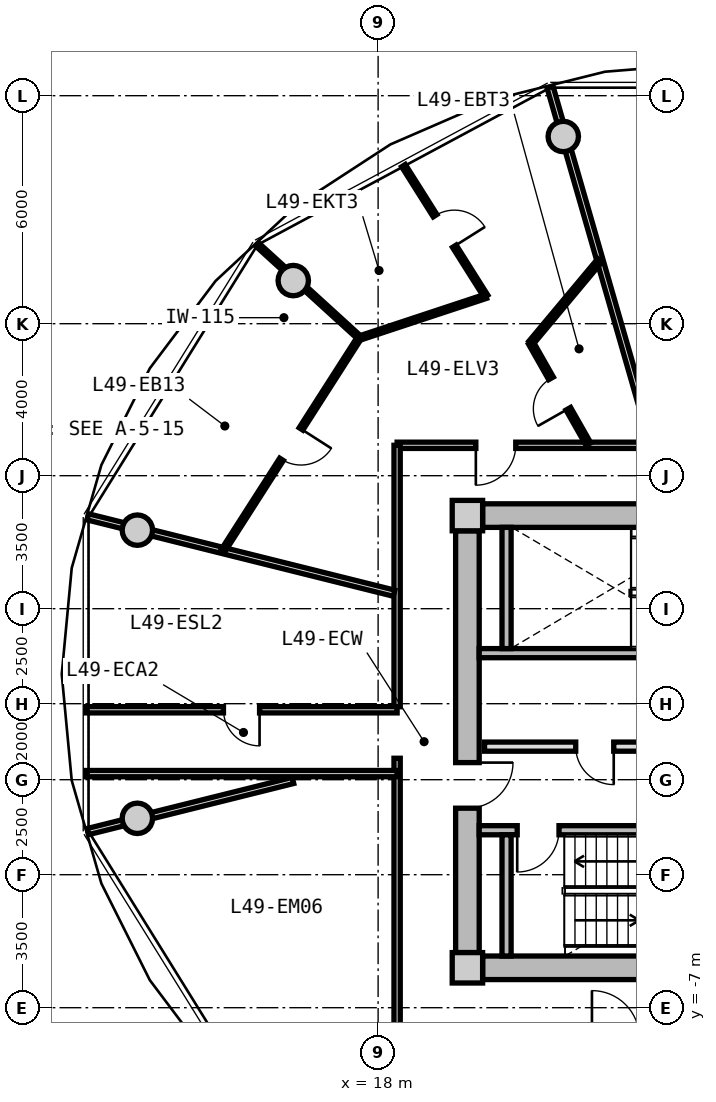
"""IFC4 building model, lengths in metres.
Left out: names, types, materials, properties, quantities, classifications, styles, units other than length and angle.
Written with IfcOpenShell. Run it as: python <this file> out.ifc"""

import sys

from ifc_helpers import new_model, si_unit, direction, frame, frame_2d, origin, origin_2d, place, context, subcontext, project, spatial, rectangle, circle, extrude, source, transform, mapped, element, fill, save


model = new_model("IFC4")
c1 = context("Model", 3, precision=1e-05, world=origin(), true_north=direction((0.0, 1.0)))
c2 = subcontext(c1, "Body", "Model", "MODEL_VIEW")
j1 = project(units=[si_unit("LENGTHUNIT", "METRE"), si_unit("PLANEANGLEUNIT", "RADIAN")], contexts=[c1])
p1 = place(None, origin())
s1 = spatial("IfcSite", under=j1, at=p1, CompositionType="ELEMENT")
p2 = place(p1, origin())
s2 = spatial("IfcBuilding", under=s1, at=p2, CompositionType="ELEMENT")
p3 = place(p2, frame((0.0, 0.0, 158.7)))
s3 = spatial("IfcBuildingStorey", under=s2, at=p3, CompositionType="ELEMENT", Elevation=158.7)
m1 = source(origin(), c2, "Body", "SweptSolid", [
    extrude(rectangle(XDim=0.8, YDim=0.8, at=origin_2d()), origin(), (0.0, 0.0, 1.0), 3.05),
])
for number, where, z_axis, x_axis in (
    (1, (20.35, -5.95, 0.0), (0.0, 0.0, 1.0), (1.0, 0.0, 0.0)),
    (2, (20.35, 5.95, 0.0), (0.0, 0.0, 1.0), (1.0, 0.0, 0.0)),
):
    element("IfcColumn", number, at=place(p3, frame(where, z_axis=z_axis, x_axis=x_axis)), inside=s3, PredefinedType="COLUMN", context=c2, shape_type="MappedRepresentation", body=[
        mapped(m1, transform((0.0, 0.0, 0.0), x_axis=(1.0, 0.0, 0.0), y_axis=(0.0, 1.0, 0.0), z_axis=(0.0, 0.0, 1.0), scale=1.0)),
    ])
m2 = source(origin(), c2, "Body", "SweptSolid", [
    extrude(rectangle(XDim=14.5, YDim=0.62, at=frame_2d((7.25, 0.0))), origin(), (0.0, 0.0, 1.0), 2.81),
])
for number, where, z_axis, x_axis in (
    (3, (20.75, 5.95, 0.0), (0.0, 0.0, 1.0), (1.0, 0.0, 0.0)),
    (4, (35.25, -5.95, 0.0), (0.0, 0.0, 1.0), (-1.0, 0.0, 0.0)),
):
    element("IfcWall", number, at=place(p3, frame(where, z_axis=z_axis, x_axis=x_axis)), inside=s3, PredefinedType="SHEAR", context=c2, shape_type="MappedRepresentation", body=[
        mapped(m2, transform((0.0, 0.0, 0.0), x_axis=(1.0, 0.0, 0.0), y_axis=(0.0, 1.0, 0.0), z_axis=(0.0, 0.0, 1.0), scale=1.0)),
    ])
m3 = source(origin(), c2, "Body", "SweptSolid", [
    extrude(rectangle(XDim=11.1, YDim=0.62, at=frame_2d((5.55, 0.0))), origin(), (0.0, 0.0, 1.0), 2.81),
])
p4 = place(p3, frame((20.35, -5.55, 0.0), z_axis=(0.0, 0.0, 1.0), x_axis=(0.0, 1.0, 0.0)))
e5 = element("IfcWall", 5, at=p4, inside=s3, PredefinedType="SHEAR", context=c2, shape_type="MappedRepresentation", body=[
    mapped(m3, transform((0.0, 0.0, 0.0), x_axis=(1.0, 0.0, 0.0), y_axis=(0.0, 1.0, 0.0), z_axis=(0.0, 0.0, 1.0), scale=1.0)),
])
p5 = place(p4, frame((3.8, 0.0, 0.0)))
e6 = element("IfcOpeningElement", 6, at=p5, cuts=e5, PredefinedType="OPENING", context=c2, shape_type="SweptSolid", body=[
    extrude(rectangle(XDim=1.2, YDim=2.15, at=frame_2d((0.6, 1.075))), frame((0.0, 0.32, 0.0), z_axis=(0.0, -1.0, 0.0), x_axis=(1.0, 0.0, 0.0)), (0.0, 0.0, 1.0), 0.64),
])
m4 = source(origin(), c2, "Body", "SweptSolid", [
    extrude(circle(Radius=0.4, at=origin_2d()), origin(), (0.0, 0.0, 1.0), 3.05),
])
for number, where, z_axis, x_axis in (
    (7, (22.873, 15.926, 0.0), (0.0, 0.0, 1.0), (1.0, 0.0, 0.0)),
    (8, (15.767, 12.135, 0.0), (0.0, 0.0, 1.0), (1.0, 0.0, 0.0)),
    (9, (11.665, 5.567, 0.0), (0.0, 0.0, 1.0), (1.0, 0.0, 0.0)),
    (10, (11.665, -2.016, 0.0), (0.0, 0.0, 1.0), (1.0, 0.0, 0.0)),
):
    element("IfcColumn", number, at=place(p3, frame(where, z_axis=z_axis, x_axis=x_axis)), inside=s3, PredefinedType="COLUMN", context=c2, shape_type="MappedRepresentation", body=[
        mapped(m4, transform((0.0, 0.0, 0.0), x_axis=(1.0, 0.0, 0.0), y_axis=(0.0, 1.0, 0.0), z_axis=(0.0, 0.0, 1.0), scale=1.0)),
    ])
m5 = source(origin(), c2, "Body", "SweptSolid", [
    extrude(rectangle(XDim=7.88, YDim=0.24, at=frame_2d((3.94, 0.0))), origin(), (0.0, 0.0, 1.0), 2.81),
])
p6 = place(p3, frame((20.66, 2.33, 0.0), z_axis=(0.0, 0.0, 1.0), x_axis=(1.0, 0.0, 0.0)))
e11 = element("IfcWall", 11, at=p6, inside=s3, PredefinedType="PARTITIONING", context=c2, shape_type="MappedRepresentation", body=[
    mapped(m5, transform((0.0, 0.0, 0.0), x_axis=(1.0, 0.0, 0.0), y_axis=(0.0, 1.0, 0.0), z_axis=(0.0, 0.0, 1.0), scale=1.0)),
])
m6 = source(origin(), c2, "Body", "SweptSolid", [
    extrude(rectangle(XDim=3.19, YDim=0.24, at=frame_2d((1.595, 0.0))), origin(), (0.0, 0.0, 1.0), 2.81),
])
p7 = place(p3, frame((21.38, 2.45, 0.0), z_axis=(0.0, 0.0, 1.0), x_axis=(0.0, 1.0, 0.0)))
e12 = element("IfcWall", 12, at=p7, inside=s3, PredefinedType="PARTITIONING", context=c2, shape_type="MappedRepresentation", body=[
    mapped(m6, transform((0.0, 0.0, 0.0), x_axis=(1.0, 0.0, 0.0), y_axis=(0.0, 1.0, 0.0), z_axis=(0.0, 0.0, 1.0), scale=1.0)),
])
p8 = place(p3, frame((20.66, -2.33, 0.0), z_axis=(0.0, 0.0, 1.0), x_axis=(1.0, 0.0, 0.0)))
e13 = element("IfcWall", 13, at=p8, inside=s3, PredefinedType="PARTITIONING", context=c2, shape_type="MappedRepresentation", body=[
    mapped(m5, transform((0.0, 0.0, 0.0), x_axis=(1.0, 0.0, 0.0), y_axis=(0.0, 1.0, 0.0), z_axis=(0.0, 0.0, 1.0), scale=1.0)),
])
p9 = place(p8, frame((1.0, 0.0, 0.0)))
e14 = element("IfcOpeningElement", 14, at=p9, cuts=e13, PredefinedType="OPENING", context=c2, shape_type="SweptSolid", body=[
    extrude(rectangle(XDim=1.1, YDim=2.15, at=frame_2d((0.55, 1.075))), frame((0.0, 0.13, 0.0), z_axis=(0.0, -1.0, 0.0), x_axis=(1.0, 0.0, 0.0)), (0.0, 0.0, 1.0), 0.26),
])
p10 = place(p3, frame((21.38, -5.64, 0.0), z_axis=(0.0, 0.0, 1.0), x_axis=(0.0, 1.0, 0.0)))
e15 = element("IfcWall", 15, at=p10, inside=s3, PredefinedType="PARTITIONING", context=c2, shape_type="MappedRepresentation", body=[
    mapped(m6, transform((0.0, 0.0, 0.0), x_axis=(1.0, 0.0, 0.0), y_axis=(0.0, 1.0, 0.0), z_axis=(0.0, 0.0, 1.0), scale=1.0)),
])
m7 = source(origin(), c2, "Body", "SweptSolid", [
    extrude(rectangle(XDim=7.62, YDim=0.24, at=frame_2d((3.81, 0.0))), origin(), (0.0, 0.0, 1.0), 2.795),
])
p11 = place(p3, frame((20.8, -0.13, 0.0), z_axis=(0.0, 0.0, 1.0), x_axis=(1.0, 0.0, 0.0)))
e16 = element("IfcWall", 16, at=p11, inside=s3, PredefinedType="PARTITIONING", context=c2, shape_type="MappedRepresentation", body=[
    mapped(m7, transform((0.0, 0.0, 0.0), x_axis=(1.0, 0.0, 0.0), y_axis=(0.0, 1.0, 0.0), z_axis=(0.0, 0.0, 1.0), scale=1.0)),
])
p12 = place(p11, frame((6.22, 0.0, 0.0)))
e17 = element("IfcOpeningElement", 17, at=p12, cuts=e16, PredefinedType="OPENING", context=c2, shape_type="SweptSolid", body=[
    extrude(rectangle(XDim=1.0, YDim=2.1, at=frame_2d((0.5, 1.05))), frame((0.0, 0.13, 0.0), z_axis=(0.0, -1.0, 0.0), x_axis=(1.0, 0.0, 0.0)), (0.0, 0.0, 1.0), 0.26),
])
p13 = place(p11, frame((2.4, 0.0, 0.0)))
e18 = element("IfcOpeningElement", 18, at=p13, cuts=e16, PredefinedType="OPENING", context=c2, shape_type="SweptSolid", body=[
    extrude(rectangle(XDim=1.0, YDim=2.1, at=frame_2d((0.5, 1.05))), frame((0.0, 0.13, 0.0), z_axis=(0.0, -1.0, 0.0), x_axis=(1.0, 0.0, 0.0)), (0.0, 0.0, 1.0), 0.26),
])
m8 = source(origin(), c2, "Body", "SweptSolid", [
    extrude(rectangle(XDim=8.58, YDim=0.165, at=frame_2d((4.29, 0.0))), origin(), (0.0, 0.0, 1.0), 2.795),
])
p14 = place(p3, frame((18.5, 7.8, 0.0), z_axis=(0.0, 0.0, 1.0), x_axis=(1.0, 0.0, 0.0)))
e19 = element("IfcWall", 19, at=p14, inside=s3, PredefinedType="PARTITIONING", context=c2, shape_type="MappedRepresentation", body=[
    mapped(m8, transform((0.0, 0.0, 0.0), x_axis=(1.0, 0.0, 0.0), y_axis=(0.0, 1.0, 0.0), z_axis=(0.0, 0.0, 1.0), scale=1.0)),
])
p15 = place(p14, frame((2.072, 0.0, 0.0)))
e20 = element("IfcOpeningElement", 20, at=p15, cuts=e19, PredefinedType="OPENING", context=c2, shape_type="SweptSolid", body=[
    extrude(rectangle(XDim=1.05, YDim=2.15, at=frame_2d((0.525, 1.075))), frame((0.0, 0.093, 0.0), z_axis=(0.0, -1.0, 0.0), x_axis=(1.0, 0.0, 0.0)), (0.0, 0.0, 1.0), 0.185),
])
m9 = source(origin(), c2, "Body", "SweptSolid", [
    extrude(rectangle(XDim=7.365, YDim=0.165, at=frame_2d((3.682, 0.0))), origin(), (0.0, 0.0, 1.0), 2.795),
])
p16 = place(p3, frame((18.5, -7.8, 0.0), z_axis=(0.0, 0.0, 1.0), x_axis=(0.0, 1.0, 0.0)))
e21 = element("IfcWall", 21, at=p16, inside=s3, PredefinedType="PARTITIONING", context=c2, shape_type="MappedRepresentation", body=[
    mapped(m9, transform((0.0, 0.0, 0.0), x_axis=(1.0, 0.0, 0.0), y_axis=(0.0, 1.0, 0.0), z_axis=(0.0, 0.0, 1.0), scale=1.0)),
])
m10 = source(origin(), c2, "Body", "SweptSolid", [
    extrude(rectangle(XDim=6.88, YDim=0.165, at=frame_2d((3.44, 0.0))), origin(), (0.0, 0.0, 1.0), 2.795),
])
p17 = place(p3, frame((18.5, 0.92, 0.0), z_axis=(0.0, 0.0, 1.0), x_axis=(0.0, 1.0, 0.0)))
e22 = element("IfcWall", 22, at=p17, inside=s3, PredefinedType="PARTITIONING", context=c2, shape_type="MappedRepresentation", body=[
    mapped(m10, transform((0.0, 0.0, 0.0), x_axis=(1.0, 0.0, 0.0), y_axis=(0.0, 1.0, 0.0), z_axis=(0.0, 0.0, 1.0), scale=1.0)),
])
m11 = source(origin(), c2, "Body", "SweptSolid", [
    extrude(rectangle(XDim=9.73, YDim=0.165, at=frame_2d((4.865, 0.0))), origin(), (0.0, 0.0, 1.0), 2.345),
])
p18 = place(p3, frame((25.217, 7.88, 0.0), z_axis=(0.0, 0.0, 1.0), x_axis=(-0.27679492614, 0.960929013436, 0.0)))
e23 = element("IfcWall", 23, at=p18, inside=s3, PredefinedType="PARTITIONING", context=c2, shape_type="MappedRepresentation", body=[
    mapped(m11, transform((0.0, 0.0, 0.0), x_axis=(1.0, 0.0, 0.0), y_axis=(0.0, 1.0, 0.0), z_axis=(0.0, 0.0, 1.0), scale=1.0)),
])
m12 = source(origin(), c2, "Body", "SweptSolid", [
    extrude(rectangle(XDim=8.305, YDim=0.165, at=frame_2d((4.153, 0.0))), origin(), (0.0, 0.0, 1.0), 2.345),
])
p19 = place(p3, frame((18.42, 3.908, 0.0), z_axis=(0.0, 0.0, 1.0), x_axis=(-0.970309994378, 0.241864662175, 0.0)))
e24 = element("IfcWall", 24, at=p19, inside=s3, PredefinedType="PARTITIONING", context=c2, shape_type="MappedRepresentation", body=[
    mapped(m12, transform((0.0, 0.0, 0.0), x_axis=(1.0, 0.0, 0.0), y_axis=(0.0, 1.0, 0.0), z_axis=(0.0, 0.0, 1.0), scale=1.0)),
])
m13 = source(origin(), c2, "Body", "SweptSolid", [
    extrude(rectangle(XDim=5.564, YDim=0.165, at=frame_2d((2.782, 0.0))), origin(), (0.0, 0.0, 1.0), 2.345),
])
p20 = place(p3, frame((15.76, -1.02, 0.0), z_axis=(0.0, 0.0, 1.0), x_axis=(-0.970315176167, -0.241843872984, 0.0)))
e25 = element("IfcWall", 25, at=p20, inside=s3, PredefinedType="PARTITIONING", context=c2, shape_type="MappedRepresentation", body=[
    mapped(m13, transform((0.0, 0.0, 0.0), x_axis=(1.0, 0.0, 0.0), y_axis=(0.0, 1.0, 0.0), z_axis=(0.0, 0.0, 1.0), scale=1.0)),
])
m14 = source(origin(), c2, "Body", "SweptSolid", [
    extrude(rectangle(XDim=8.189, YDim=0.165, at=frame_2d((4.094, 0.0))), origin(), (0.0, 0.0, 1.0), 2.795),
])
p21 = place(p3, frame((10.311, 0.84, 0.0), z_axis=(0.0, 0.0, 1.0), x_axis=(1.0, 0.0, 0.0)))
e26 = element("IfcWall", 26, at=p21, inside=s3, PredefinedType="PARTITIONING", context=c2, shape_type="MappedRepresentation", body=[
    mapped(m14, transform((0.0, 0.0, 0.0), x_axis=(1.0, 0.0, 0.0), y_axis=(0.0, 1.0, 0.0), z_axis=(0.0, 0.0, 1.0), scale=1.0)),
])
p22 = place(p21, frame((3.619, 0.0, 0.0)))
e27 = element("IfcOpeningElement", 27, at=p22, cuts=e26, PredefinedType="OPENING", context=c2, shape_type="SweptSolid", body=[
    extrude(rectangle(XDim=0.95, YDim=2.1, at=frame_2d((0.475, 1.05))), frame((0.0, 0.093, 0.0), z_axis=(0.0, -1.0, 0.0), x_axis=(1.0, 0.0, 0.0)), (0.0, 0.0, 1.0), 0.185),
])
p23 = place(p3, frame((18.5, -0.84, 0.0), z_axis=(0.0, 0.0, 1.0), x_axis=(-1.0, 0.0, 0.0)))
e28 = element("IfcWall", 28, at=p23, inside=s3, PredefinedType="PARTITIONING", context=c2, shape_type="MappedRepresentation", body=[
    mapped(m14, transform((0.0, 0.0, 0.0), x_axis=(1.0, 0.0, 0.0), y_axis=(0.0, 1.0, 0.0), z_axis=(0.0, 0.0, 1.0), scale=1.0)),
])
m15 = source(origin(), c2, "Body", "SweptSolid", [
    extrude(rectangle(XDim=6.654, YDim=0.115, at=frame_2d((3.327, 0.0))), origin(), (0.0, 0.0, 1.0), 2.795),
])
p24 = place(p3, frame((17.509, 10.632, 0.0), z_axis=(0.0, 0.0, 1.0), x_axis=(-0.53923796816, -0.842153438332, 0.0)))
e29 = element("IfcWall", 29, at=p24, inside=s3, PredefinedType="PARTITIONING", context=c2, shape_type="MappedRepresentation", body=[
    mapped(m15, transform((0.0, 0.0, 0.0), x_axis=(1.0, 0.0, 0.0), y_axis=(0.0, 1.0, 0.0), z_axis=(0.0, 0.0, 1.0), scale=1.0)),
])
p25 = place(p24, frame((2.852, 0.0, 0.0)))
e30 = element("IfcOpeningElement", 30, at=p25, cuts=e29, PredefinedType="OPENING", context=c2, shape_type="SweptSolid", body=[
    extrude(rectangle(XDim=0.95, YDim=2.1, at=frame_2d((0.475, 1.05))), frame((0.0, 0.067, 0.0), z_axis=(0.0, -1.0, 0.0), x_axis=(1.0, 0.0, 0.0)), (0.0, 0.0, 1.0), 0.135),
])
m16 = source(origin(), c2, "Body", "SweptSolid", [
    extrude(rectangle(XDim=3.648, YDim=0.115, at=frame_2d((1.824, 0.0))), origin(), (0.0, 0.0, 1.0), 2.345),
])
p26 = place(p3, frame((17.509, 10.632, 0.0), z_axis=(0.0, 0.0, 1.0), x_axis=(-0.739109697605, 0.67358507622, 0.0)))
e31 = element("IfcWall", 31, at=p26, inside=s3, PredefinedType="PARTITIONING", context=c2, shape_type="MappedRepresentation", body=[
    mapped(m16, transform((0.0, 0.0, 0.0), x_axis=(1.0, 0.0, 0.0), y_axis=(0.0, 1.0, 0.0), z_axis=(0.0, 0.0, 1.0), scale=1.0)),
])
m17 = source(origin(), c2, "Body", "SweptSolid", [
    extrude(rectangle(XDim=3.064, YDim=0.14, at=frame_2d((1.532, 0.0))), origin(), (0.0, 0.0, 1.0), 2.795),
])
p27 = place(p3, frame((23.534, 7.83, 0.0), z_axis=(0.0, 0.0, 1.0), x_axis=(-0.494103864861, 0.869402881712, 0.0)))
e32 = element("IfcWall", 32, at=p27, inside=s3, PredefinedType="PARTITIONING", context=c2, shape_type="MappedRepresentation", body=[
    mapped(m17, transform((0.0, 0.0, 0.0), x_axis=(1.0, 0.0, 0.0), y_axis=(0.0, 1.0, 0.0), z_axis=(0.0, 0.0, 1.0), scale=1.0)),
])
p28 = place(p27, frame((1.072, 0.0, 0.0)))
e33 = element("IfcOpeningElement", 33, at=p28, cuts=e32, PredefinedType="OPENING", context=c2, shape_type="SweptSolid", body=[
    extrude(rectangle(XDim=0.92, YDim=2.1, at=frame_2d((0.46, 1.05))), frame((0.0, 0.08, 0.0), z_axis=(0.0, -1.0, 0.0), x_axis=(1.0, 0.0, 0.0)), (0.0, 0.0, 1.0), 0.16),
])
m18 = source(origin(), c2, "Body", "SweptSolid", [
    extrude(rectangle(XDim=2.833, YDim=0.14, at=frame_2d((1.417, 0.0))), origin(), (0.0, 0.0, 1.0), 2.795),
])
p29 = place(p3, frame((22.02, 10.494, 0.0), z_axis=(0.0, 0.0, 1.0), x_axis=(0.64098072766, 0.767556972979, 0.0)))
e34 = element("IfcWall", 34, at=p29, inside=s3, PredefinedType="PARTITIONING", context=c2, shape_type="MappedRepresentation", body=[
    mapped(m18, transform((0.0, 0.0, 0.0), x_axis=(1.0, 0.0, 0.0), y_axis=(0.0, 1.0, 0.0), z_axis=(0.0, 0.0, 1.0), scale=1.0)),
])
m19 = source(origin(), c2, "Body", "SweptSolid", [
    extrude(rectangle(XDim=4.066, YDim=0.115, at=frame_2d((2.033, 0.0))), origin(), (0.0, 0.0, 1.0), 2.795),
])
p30 = place(p3, frame((20.838, 11.721, 0.0), z_axis=(0.0, 0.0, 1.0), x_axis=(-0.533669868169, 0.8456928945, 0.0)))
e35 = element("IfcWall", 35, at=p30, inside=s3, PredefinedType="PARTITIONING", context=c2, shape_type="MappedRepresentation", body=[
    mapped(m19, transform((0.0, 0.0, 0.0), x_axis=(1.0, 0.0, 0.0), y_axis=(0.0, 1.0, 0.0), z_axis=(0.0, 0.0, 1.0), scale=1.0)),
])
p31 = place(p30, frame((1.558, 0.0, 0.0)))
e36 = element("IfcOpeningElement", 36, at=p31, cuts=e35, PredefinedType="OPENING", context=c2, shape_type="SweptSolid", body=[
    extrude(rectangle(XDim=0.95, YDim=2.1, at=frame_2d((0.475, 1.05))), frame((0.0, 0.067, 0.0), z_axis=(0.0, -1.0, 0.0), x_axis=(1.0, 0.0, 0.0)), (0.0, 0.0, 1.0), 0.135),
])
m20 = source(origin(), c2, "Body", "SweptSolid", [
    extrude(rectangle(XDim=3.496, YDim=0.115, at=frame_2d((1.748, 0.0))), origin(), (0.0, 0.0, 1.0), 2.795),
])
p32 = place(p3, frame((20.838, 11.721, 0.0), z_axis=(0.0, 0.0, 1.0), x_axis=(-0.949420852529, -0.314006440672, 0.0)))
e37 = element("IfcWall", 37, at=p32, inside=s3, PredefinedType="PARTITIONING", context=c2, shape_type="MappedRepresentation", body=[
    mapped(m20, transform((0.0, 0.0, 0.0), x_axis=(1.0, 0.0, 0.0), y_axis=(0.0, 1.0, 0.0), z_axis=(0.0, 0.0, 1.0), scale=1.0)),
])
m21 = source(origin(), c2, "Body", "SweptSolid", [
    extrude(rectangle(XDim=1.1, YDim=2.15, at=frame_2d((0.55, 1.075))), frame((0.0, 0.025, 0.0), z_axis=(0.0, -1.0, 0.0), x_axis=(1.0, 0.0, 0.0)), (0.0, 0.0, 1.0), 0.05),
])
p33 = place(p9, frame((1.1, 0.0, 0.0), z_axis=(0.0, 0.0, 1.0), x_axis=(-1.0, 0.0, 0.0)))
e38 = element("IfcDoor", 38, at=p33, inside=s3, OperationType="SINGLE_SWING_RIGHT", PredefinedType="DOOR", context=c2, shape_type="MappedRepresentation", body=[
    mapped(m21, transform((0.0, 0.0, 0.0), x_axis=(1.0, 0.0, 0.0), y_axis=(0.0, 1.0, 0.0), z_axis=(0.0, 0.0, 1.0), scale=1.0)),
])
fill(e14, e38)
m22 = source(origin(), c2, "Body", "SweptSolid", [
    extrude(rectangle(XDim=1.2, YDim=2.15, at=frame_2d((0.6, 1.075))), frame((0.0, 0.025, 0.0), z_axis=(0.0, -1.0, 0.0), x_axis=(1.0, 0.0, 0.0)), (0.0, 0.0, 1.0), 0.05),
])
p34 = place(p5, frame((1.2, 0.0, 0.0), z_axis=(0.0, 0.0, 1.0), x_axis=(-1.0, 0.0, 0.0)))
e39 = element("IfcDoor", 39, at=p34, inside=s3, OperationType="SINGLE_SWING_LEFT", PredefinedType="DOOR", context=c2, shape_type="MappedRepresentation", body=[
    mapped(m22, transform((0.0, 0.0, 0.0), x_axis=(1.0, 0.0, 0.0), y_axis=(0.0, 1.0, 0.0), z_axis=(0.0, 0.0, 1.0), scale=1.0)),
])
fill(e6, e39)
m23 = source(origin(), c2, "Body", "SweptSolid", [
    extrude(rectangle(XDim=1.0, YDim=2.1, at=frame_2d((0.5, 1.05))), frame((0.0, 0.025, 0.0), z_axis=(0.0, -1.0, 0.0), x_axis=(1.0, 0.0, 0.0)), (0.0, 0.0, 1.0), 0.05),
])
p35 = place(p13, frame((1.0, 0.0, 0.0), z_axis=(0.0, 0.0, 1.0), x_axis=(-1.0, 0.0, 0.0)))
e40 = element("IfcDoor", 40, at=p35, inside=s3, OperationType="SINGLE_SWING_LEFT", PredefinedType="DOOR", context=c2, shape_type="MappedRepresentation", body=[
    mapped(m23, transform((0.0, 0.0, 0.0), x_axis=(1.0, 0.0, 0.0), y_axis=(0.0, 1.0, 0.0), z_axis=(0.0, 0.0, 1.0), scale=1.0)),
])
fill(e18, e40)
m24 = source(origin(), c2, "Body", "SweptSolid", [
    extrude(rectangle(XDim=0.95, YDim=2.1, at=frame_2d((0.475, 1.05))), frame((0.0, 0.025, 0.0), z_axis=(0.0, -1.0, 0.0), x_axis=(1.0, 0.0, 0.0)), (0.0, 0.0, 1.0), 0.05),
])
p36 = place(p22, frame((0.95, 0.0, 0.0), z_axis=(0.0, 0.0, 1.0), x_axis=(-1.0, 0.0, 0.0)))
e41 = element("IfcDoor", 41, at=p36, inside=s3, OperationType="SINGLE_SWING_LEFT", PredefinedType="DOOR", context=c2, shape_type="MappedRepresentation", body=[
    mapped(m24, transform((0.0, 0.0, 0.0), x_axis=(1.0, 0.0, 0.0), y_axis=(0.0, 1.0, 0.0), z_axis=(0.0, 0.0, 1.0), scale=1.0)),
])
fill(e27, e41)
m25 = source(origin(), c2, "Body", "SweptSolid", [
    extrude(rectangle(XDim=1.05, YDim=2.15, at=frame_2d((0.525, 1.075))), frame((0.0, 0.025, 0.0), z_axis=(0.0, -1.0, 0.0), x_axis=(1.0, 0.0, 0.0)), (0.0, 0.0, 1.0), 0.05),
])
p37 = place(p15, frame((1.05, 0.0, 0.0), z_axis=(0.0, 0.0, 1.0), x_axis=(-1.0, 0.0, 0.0)))
e42 = element("IfcDoor", 42, at=p37, inside=s3, OperationType="SINGLE_SWING_RIGHT", PredefinedType="DOOR", context=c2, shape_type="MappedRepresentation", body=[
    mapped(m25, transform((0.0, 0.0, 0.0), x_axis=(1.0, 0.0, 0.0), y_axis=(0.0, 1.0, 0.0), z_axis=(0.0, 0.0, 1.0), scale=1.0)),
])
fill(e20, e42)
m26 = source(origin(), c2, "Body", "SweptSolid", [
    extrude(rectangle(XDim=0.92, YDim=2.1, at=frame_2d((0.46, 1.05))), frame((0.0, 0.025, 0.0), z_axis=(0.0, -1.0, 0.0), x_axis=(1.0, 0.0, 0.0)), (0.0, 0.0, 1.0), 0.05),
])
p38 = place(p28, origin())
e43 = element("IfcDoor", 43, at=p38, inside=s3, OperationType="SINGLE_SWING_LEFT", PredefinedType="DOOR", context=c2, shape_type="MappedRepresentation", body=[
    mapped(m26, transform((0.0, 0.0, 0.0), x_axis=(1.0, 0.0, 0.0), y_axis=(0.0, 1.0, 0.0), z_axis=(0.0, 0.0, 1.0), scale=1.0)),
])
fill(e33, e43)
p39 = place(p31, frame((0.95, 0.0, 0.0), z_axis=(0.0, 0.0, 1.0), x_axis=(-1.0, 0.0, 0.0)))
e44 = element("IfcDoor", 44, at=p39, inside=s3, OperationType="SINGLE_SWING_RIGHT", PredefinedType="DOOR", context=c2, shape_type="MappedRepresentation", body=[
    mapped(m24, transform((0.0, 0.0, 0.0), x_axis=(1.0, 0.0, 0.0), y_axis=(0.0, 1.0, 0.0), z_axis=(0.0, 0.0, 1.0), scale=1.0)),
])
fill(e36, e44)
p40 = place(p25, origin())
e45 = element("IfcDoor", 45, at=p40, inside=s3, OperationType="SINGLE_SWING_LEFT", PredefinedType="DOOR", context=c2, shape_type="MappedRepresentation", body=[
    mapped(m24, transform((0.0, 0.0, 0.0), x_axis=(1.0, 0.0, 0.0), y_axis=(0.0, 1.0, 0.0), z_axis=(0.0, 0.0, 1.0), scale=1.0)),
])
fill(e30, e45)
save(model, sys.argv[1])
